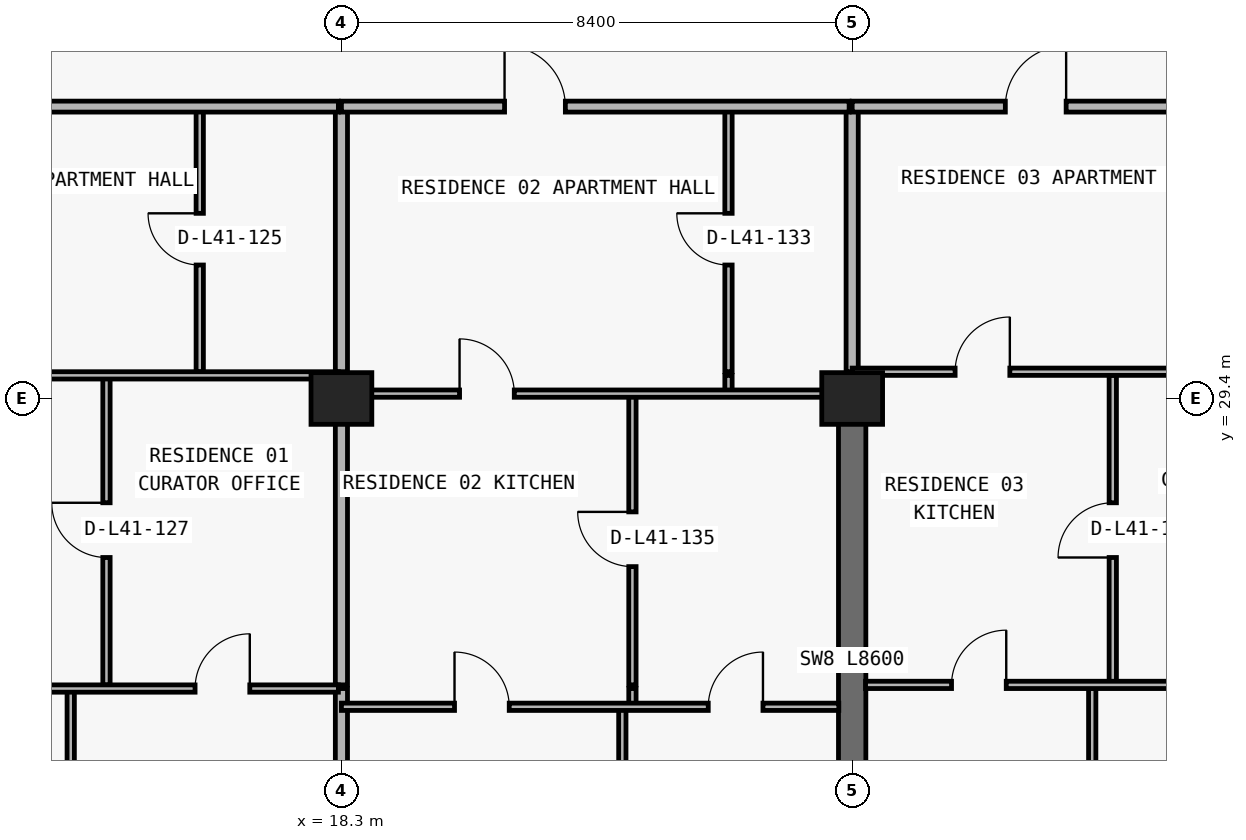
"""IFC4 building model, lengths in metres.
Left out: names, types, materials, properties, quantities, classifications, styles, units other than length and angle.
Written with IfcOpenShell. Run it as: python <this file> out.ifc"""

import sys

from ifc_helpers import new_model, si_unit, direction, frame, frame_2d, origin, origin_2d, place, context, subcontext, project, spatial, rectangle, extrude, element, fill, save


model = new_model("IFC4")
c1 = context("Model", 3, precision=1e-05, world=origin(), true_north=direction((0.0, 1.0)))
c2 = subcontext(c1, "Body", "Model", "MODEL_VIEW")
j1 = project(units=[si_unit("LENGTHUNIT", "METRE"), si_unit("PLANEANGLEUNIT", "RADIAN")], contexts=[c1])
p1 = place(None, origin())
s1 = spatial("IfcSite", under=j1, at=p1, CompositionType="ELEMENT")
p2 = place(p1, origin())
s2 = spatial("IfcBuilding", under=s1, at=p2, CompositionType="ELEMENT")
p3 = place(p2, frame((0.0, 0.0, 148.8)))
s3 = spatial("IfcBuildingStorey", under=s2, at=p3, CompositionType="ELEMENT", Elevation=148.8)
for number, where, z_axis, x_axis in (
    (1, (18.3, 29.4, 0.0), (0.0, 0.0, 1.0), (1.0, 0.0, 0.0)),
    (2, (26.7, 29.4, 0.0), (0.0, 0.0, 1.0), (1.0, 0.0, 0.0)),
):
    element("IfcColumn", number, at=place(p3, frame(where, z_axis=z_axis, x_axis=x_axis)), inside=s3, PredefinedType="COLUMN", context=c2, shape_type="SweptSolid", body=[
        extrude(rectangle(XDim=1.0, YDim=0.85, at=origin_2d()), origin(), (0.0, 0.0, 1.0), 3.0),
    ])
p4 = place(p3, frame((26.7, 20.8, 0.0), z_axis=(0.0, 0.0, 1.0), x_axis=(0.0, 1.0, 0.0)))
e3 = element("IfcWall", 3, at=p4, inside=s3, PredefinedType="SHEAR", context=c2, shape_type="SweptSolid", body=[
    extrude(rectangle(XDim=8.6, YDim=0.45, at=frame_2d((4.3, 0.0))), origin(), (0.0, 0.0, 1.0), 3.0),
])
p5 = place(p3, frame((13.848, 8.84, 0.0), z_axis=(0.0, 0.0, 1.0), x_axis=(0.0, 1.0, 0.0)))
e4 = element("IfcWall", 4, at=p5, inside=s3, PredefinedType="PARTITIONING", context=c2, shape_type="SweptSolid", body=[
    extrude(rectangle(XDim=15.79, YDim=0.12, at=frame_2d((7.895, 0.0))), origin(), (0.0, 0.0, 1.0), 3.0),
])
p6 = place(p3, frame((14.436, 24.69, 0.0), z_axis=(0.0, 0.0, 1.0), x_axis=(0.0, 1.0, 0.0)))
e5 = element("IfcWall", 5, at=p6, inside=s3, PredefinedType="PARTITIONING", context=c2, shape_type="SweptSolid", body=[
    extrude(rectangle(XDim=5.09, YDim=0.12, at=frame_2d((2.545, 0.0))), origin(), (0.0, 0.0, 1.0), 3.0),
])
p7 = place(p6, frame((2.095, 0.0, 0.0)))
e6 = element("IfcOpeningElement", 6, at=p7, cuts=e5, PredefinedType="OPENING", context=c2, shape_type="SweptSolid", body=[
    extrude(rectangle(XDim=0.9, YDim=2.15, at=frame_2d((0.45, 1.075))), frame((0.0, 0.07, 0.0), z_axis=(0.0, -1.0, 0.0), x_axis=(1.0, 0.0, 0.0)), (0.0, 0.0, 1.0), 0.14),
])
p8 = place(p3, frame((15.97, 29.84, 0.0), z_axis=(0.0, 0.0, 1.0), x_axis=(0.0, 1.0, 0.0)))
e7 = element("IfcWall", 7, at=p8, inside=s3, PredefinedType="PARTITIONING", context=c2, shape_type="SweptSolid", body=[
    extrude(rectangle(XDim=4.36, YDim=0.12, at=frame_2d((2.18, 0.0))), origin(), (0.0, 0.0, 1.0), 3.0),
])
p9 = place(p8, frame((1.755, 0.0, 0.0)))
e8 = element("IfcOpeningElement", 8, at=p9, cuts=e7, PredefinedType="OPENING", context=c2, shape_type="SweptSolid", body=[
    extrude(rectangle(XDim=0.85, YDim=2.1, at=frame_2d((0.425, 1.05))), frame((0.0, 0.07, 0.0), z_axis=(0.0, -1.0, 0.0), x_axis=(1.0, 0.0, 0.0)), (0.0, 0.0, 1.0), 0.14),
])
p10 = place(p3, frame((18.3, 8.84, 0.0), z_axis=(0.0, 0.0, 1.0), x_axis=(0.0, 1.0, 0.0)))
e9 = element("IfcWall", 9, at=p10, inside=s3, PredefinedType="PARTITIONING", context=c2, shape_type="SweptSolid", body=[
    extrude(rectangle(XDim=15.79, YDim=0.2, at=frame_2d((7.895, 0.0))), origin(), (0.0, 0.0, 1.0), 2.124),
])
p11 = place(p3, frame((18.3, 24.69, 0.0), z_axis=(0.0, 0.0, 1.0), x_axis=(0.0, 1.0, 0.0)))
e10 = element("IfcWall", 10, at=p11, inside=s3, PredefinedType="PARTITIONING", context=c2, shape_type="SweptSolid", body=[
    extrude(rectangle(XDim=5.09, YDim=0.2, at=frame_2d((2.545, 0.0))), origin(), (0.0, 0.0, 1.0), 2.124),
])
p12 = place(p3, frame((18.3, 29.84, 0.0), z_axis=(0.0, 0.0, 1.0), x_axis=(0.0, 1.0, 0.0)))
e11 = element("IfcWall", 11, at=p12, inside=s3, PredefinedType="PARTITIONING", context=c2, shape_type="SweptSolid", body=[
    extrude(rectangle(XDim=4.36, YDim=0.2, at=frame_2d((2.18, 0.0))), origin(), (0.0, 0.0, 1.0), 2.124),
])
p13 = place(p3, frame((22.92, 8.84, 0.0), z_axis=(0.0, 0.0, 1.0), x_axis=(0.0, 1.0, 0.0)))
e12 = element("IfcWall", 12, at=p13, inside=s3, PredefinedType="PARTITIONING", context=c2, shape_type="SweptSolid", body=[
    extrude(rectangle(XDim=15.49, YDim=0.12, at=frame_2d((7.745, 0.0))), origin(), (0.0, 0.0, 1.0), 3.0),
])
p14 = place(p3, frame((23.086, 24.335, 0.0), z_axis=(0.0, 0.0, 1.0), x_axis=(0.0, 1.0, 0.0)))
e13 = element("IfcWall", 13, at=p14, inside=s3, PredefinedType="PARTITIONING", context=c2, shape_type="SweptSolid", body=[
    extrude(rectangle(XDim=0.295, YDim=0.12, at=frame_2d((0.147, 0.0))), origin(), (0.0, 0.0, 1.0), 3.0),
])
p15 = place(p3, frame((23.086, 24.69, 0.0), z_axis=(0.0, 0.0, 1.0), x_axis=(0.0, 1.0, 0.0)))
e14 = element("IfcWall", 14, at=p15, inside=s3, PredefinedType="PARTITIONING", context=c2, shape_type="SweptSolid", body=[
    extrude(rectangle(XDim=4.79, YDim=0.12, at=frame_2d((2.395, 0.0))), origin(), (0.0, 0.0, 1.0), 3.0),
])
p16 = place(p15, frame((1.945, 0.0, 0.0)))
e15 = element("IfcOpeningElement", 15, at=p16, cuts=e14, PredefinedType="OPENING", context=c2, shape_type="SweptSolid", body=[
    extrude(rectangle(XDim=0.9, YDim=2.15, at=frame_2d((0.45, 1.075))), frame((0.0, 0.07, 0.0), z_axis=(0.0, -1.0, 0.0), x_axis=(1.0, 0.0, 0.0)), (0.0, 0.0, 1.0), 0.14),
])
p17 = place(p3, frame((24.666, 29.48, 0.0), z_axis=(0.0, 0.0, 1.0), x_axis=(0.0, 1.0, 0.0)))
e16 = element("IfcWall", 16, at=p17, inside=s3, PredefinedType="PARTITIONING", context=c2, shape_type="SweptSolid", body=[
    extrude(rectangle(XDim=0.3, YDim=0.12, at=frame_2d((0.15, 0.0))), origin(), (0.0, 0.0, 1.0), 3.0),
])
p18 = place(p3, frame((24.666, 29.84, 0.0), z_axis=(0.0, 0.0, 1.0), x_axis=(0.0, 1.0, 0.0)))
e17 = element("IfcWall", 17, at=p18, inside=s3, PredefinedType="PARTITIONING", context=c2, shape_type="SweptSolid", body=[
    extrude(rectangle(XDim=4.36, YDim=0.12, at=frame_2d((2.18, 0.0))), origin(), (0.0, 0.0, 1.0), 3.0),
])
p19 = place(p18, frame((1.755, 0.0, 0.0)))
e18 = element("IfcOpeningElement", 18, at=p19, cuts=e17, PredefinedType="OPENING", context=c2, shape_type="SweptSolid", body=[
    extrude(rectangle(XDim=0.85, YDim=2.1, at=frame_2d((0.425, 1.05))), frame((0.0, 0.07, 0.0), z_axis=(0.0, -1.0, 0.0), x_axis=(1.0, 0.0, 0.0)), (0.0, 0.0, 1.0), 0.14),
])
p20 = place(p3, frame((26.7, 29.405, 0.0), z_axis=(0.0, 0.0, 1.0), x_axis=(0.0, 1.0, 0.0)))
e19 = element("IfcWall", 19, at=p20, inside=s3, PredefinedType="PARTITIONING", context=c2, shape_type="SweptSolid", body=[
    extrude(rectangle(XDim=0.375, YDim=0.2, at=frame_2d((0.188, 0.0))), origin(), (0.0, 0.0, 1.0), 3.0),
])
p21 = place(p3, frame((26.7, 29.84, 0.0), z_axis=(0.0, 0.0, 1.0), x_axis=(0.0, 1.0, 0.0)))
e20 = element("IfcWall", 20, at=p21, inside=s3, PredefinedType="PARTITIONING", context=c2, shape_type="SweptSolid", body=[
    extrude(rectangle(XDim=4.36, YDim=0.2, at=frame_2d((2.18, 0.0))), origin(), (0.0, 0.0, 1.0), 2.285),
])
p22 = place(p3, frame((30.648, 8.84, 0.0), z_axis=(0.0, 0.0, 1.0), x_axis=(0.0, 1.0, 0.0)))
e21 = element("IfcWall", 21, at=p22, inside=s3, PredefinedType="PARTITIONING", context=c2, shape_type="SweptSolid", body=[
    extrude(rectangle(XDim=15.79, YDim=0.12, at=frame_2d((7.895, 0.0))), origin(), (0.0, 0.0, 1.0), 3.0),
])
p23 = place(p3, frame((30.986, 24.69, 0.0), z_axis=(0.0, 0.0, 1.0), x_axis=(0.0, 1.0, 0.0)))
e22 = element("IfcWall", 22, at=p23, inside=s3, PredefinedType="PARTITIONING", context=c2, shape_type="SweptSolid", body=[
    extrude(rectangle(XDim=5.09, YDim=0.12, at=frame_2d((2.545, 0.0))), origin(), (0.0, 0.0, 1.0), 2.436),
])
p24 = place(p23, frame((2.095, 0.0, 0.0)))
e23 = element("IfcOpeningElement", 23, at=p24, cuts=e22, PredefinedType="OPENING", context=c2, shape_type="SweptSolid", body=[
    extrude(rectangle(XDim=0.9, YDim=2.15, at=frame_2d((0.45, 1.075))), frame((0.0, 0.07, 0.0), z_axis=(0.0, -1.0, 0.0), x_axis=(1.0, 0.0, 0.0)), (0.0, 0.0, 1.0), 0.14),
])
p25 = place(p3, frame((18.3, 24.33, 0.0), z_axis=(0.0, 0.0, 1.0), x_axis=(1.0, 0.0, 0.0)))
e24 = element("IfcWall", 24, at=p25, inside=s3, PredefinedType="PARTITIONING", context=c2, shape_type="SweptSolid", body=[
    extrude(rectangle(XDim=8.18, YDim=0.12, at=frame_2d((4.09, 0.0))), origin(), (0.0, 0.0, 1.0), 3.0),
])
p26 = place(p25, frame((1.86, 0.0, 0.0)))
e25 = element("IfcOpeningElement", 25, at=p26, cuts=e24, PredefinedType="OPENING", context=c2, shape_type="SweptSolid", body=[
    extrude(rectangle(XDim=0.9, YDim=2.15, at=frame_2d((0.45, 1.075))), frame((0.0, 0.07, 0.0), z_axis=(0.0, -1.0, 0.0), x_axis=(1.0, 0.0, 0.0)), (0.0, 0.0, 1.0), 0.14),
])
p27 = place(p25, frame((6.033, 0.0, 0.0)))
e26 = element("IfcOpeningElement", 26, at=p27, cuts=e24, PredefinedType="OPENING", context=c2, shape_type="SweptSolid", body=[
    extrude(rectangle(XDim=0.9, YDim=2.15, at=frame_2d((0.45, 1.075))), frame((0.0, 0.07, 0.0), z_axis=(0.0, -1.0, 0.0), x_axis=(1.0, 0.0, 0.0)), (0.0, 0.0, 1.0), 0.14),
])
p28 = place(p3, frame((9.9, 24.63, 0.0), z_axis=(0.0, 0.0, 1.0), x_axis=(1.0, 0.0, 0.0)))
e27 = element("IfcWall", 27, at=p28, inside=s3, PredefinedType="PARTITIONING", context=c2, shape_type="SweptSolid", body=[
    extrude(rectangle(XDim=8.35, YDim=0.12, at=frame_2d((4.175, 0.0))), origin(), (0.0, 0.0, 1.0), 3.0),
])
p29 = place(p28, frame((1.524, 0.0, 0.0)))
e28 = element("IfcOpeningElement", 28, at=p29, cuts=e27, PredefinedType="OPENING", context=c2, shape_type="SweptSolid", body=[
    extrude(rectangle(XDim=0.9, YDim=2.15, at=frame_2d((0.45, 1.075))), frame((0.0, 0.07, 0.0), z_axis=(0.0, -1.0, 0.0), x_axis=(1.0, 0.0, 0.0)), (0.0, 0.0, 1.0), 0.14),
])
p30 = place(p28, frame((5.993, 0.0, 0.0)))
e29 = element("IfcOpeningElement", 29, at=p30, cuts=e27, PredefinedType="OPENING", context=c2, shape_type="SweptSolid", body=[
    extrude(rectangle(XDim=0.9, YDim=2.15, at=frame_2d((0.45, 1.075))), frame((0.0, 0.07, 0.0), z_axis=(0.0, -1.0, 0.0), x_axis=(1.0, 0.0, 0.0)), (0.0, 0.0, 1.0), 0.14),
])
p31 = place(p3, frame((26.92, 24.69, 0.0), z_axis=(0.0, 0.0, 1.0), x_axis=(1.0, 0.0, 0.0)))
e30 = element("IfcWall", 30, at=p31, inside=s3, PredefinedType="PARTITIONING", context=c2, shape_type="SweptSolid", body=[
    extrude(rectangle(XDim=8.18, YDim=0.12, at=frame_2d((4.09, 0.0))), origin(), (0.0, 0.0, 1.0), 3.0),
])
p32 = place(p31, frame((1.414, 0.0, 0.0)))
e31 = element("IfcOpeningElement", 31, at=p32, cuts=e30, PredefinedType="OPENING", context=c2, shape_type="SweptSolid", body=[
    extrude(rectangle(XDim=0.9, YDim=2.15, at=frame_2d((0.45, 1.075))), frame((0.0, 0.07, 0.0), z_axis=(0.0, -1.0, 0.0), x_axis=(1.0, 0.0, 0.0)), (0.0, 0.0, 1.0), 0.14),
])
p33 = place(p31, frame((5.673, 0.0, 0.0)))
e32 = element("IfcOpeningElement", 32, at=p33, cuts=e30, PredefinedType="OPENING", context=c2, shape_type="SweptSolid", body=[
    extrude(rectangle(XDim=0.9, YDim=2.15, at=frame_2d((0.45, 1.075))), frame((0.0, 0.07, 0.0), z_axis=(0.0, -1.0, 0.0), x_axis=(1.0, 0.0, 0.0)), (0.0, 0.0, 1.0), 0.14),
])
p34 = place(p3, frame((18.3, 29.48, 0.0), z_axis=(0.0, 0.0, 1.0), x_axis=(1.0, 0.0, 0.0)))
e33 = element("IfcWall", 33, at=p34, inside=s3, PredefinedType="PARTITIONING", context=c2, shape_type="SweptSolid", body=[
    extrude(rectangle(XDim=8.18, YDim=0.12, at=frame_2d((4.09, 0.0))), origin(), (0.0, 0.0, 1.0), 2.124),
])
p35 = place(p34, frame((1.943, 0.0, 0.0)))
e34 = element("IfcOpeningElement", 34, at=p35, cuts=e33, PredefinedType="OPENING", context=c2, shape_type="SweptSolid", body=[
    extrude(rectangle(XDim=0.9, YDim=2.074, at=frame_2d((0.45, 1.037))), frame((0.0, 0.07, 0.0), z_axis=(0.0, -1.0, 0.0), x_axis=(1.0, 0.0, 0.0)), (0.0, 0.0, 1.0), 0.14),
])
p36 = place(p3, frame((9.9, 29.78, 0.0), z_axis=(0.0, 0.0, 1.0), x_axis=(1.0, 0.0, 0.0)))
e35 = element("IfcWall", 35, at=p36, inside=s3, PredefinedType="PARTITIONING", context=c2, shape_type="SweptSolid", body=[
    extrude(rectangle(XDim=8.35, YDim=0.12, at=frame_2d((4.175, 0.0))), origin(), (0.0, 0.0, 1.0), 3.0),
])
p37 = place(p36, frame((1.818, 0.0, 0.0)))
e36 = element("IfcOpeningElement", 36, at=p37, cuts=e35, PredefinedType="OPENING", context=c2, shape_type="SweptSolid", body=[
    extrude(rectangle(XDim=0.9, YDim=2.15, at=frame_2d((0.45, 1.075))), frame((0.0, 0.07, 0.0), z_axis=(0.0, -1.0, 0.0), x_axis=(1.0, 0.0, 0.0)), (0.0, 0.0, 1.0), 0.14),
])
p38 = place(p3, frame((26.7, 29.84, 0.0), z_axis=(0.0, 0.0, 1.0), x_axis=(1.0, 0.0, 0.0)))
e37 = element("IfcWall", 37, at=p38, inside=s3, PredefinedType="PARTITIONING", context=c2, shape_type="SweptSolid", body=[
    extrude(rectangle(XDim=8.4, YDim=0.12, at=frame_2d((4.2, 0.0))), origin(), (0.0, 0.0, 1.0), 3.0),
])
p39 = place(p38, frame((1.693, 0.0, 0.0)))
e38 = element("IfcOpeningElement", 38, at=p39, cuts=e37, PredefinedType="OPENING", context=c2, shape_type="SweptSolid", body=[
    extrude(rectangle(XDim=0.9, YDim=2.15, at=frame_2d((0.45, 1.075))), frame((0.0, 0.07, 0.0), z_axis=(0.0, -1.0, 0.0), x_axis=(1.0, 0.0, 0.0)), (0.0, 0.0, 1.0), 0.14),
])
p40 = place(p3, frame((7.705, 34.2, 0.0), z_axis=(0.0, 0.0, 1.0), x_axis=(1.0, 0.0, 0.0)))
e39 = element("IfcWall", 39, at=p40, inside=s3, PredefinedType="PARTITIONING", context=c2, shape_type="SweptSolid", body=[
    extrude(rectangle(XDim=10.545, YDim=0.18, at=frame_2d((5.272, 0.0))), origin(), (0.0, 0.0, 1.0), 3.0),
])
p41 = place(p40, frame((4.73, 0.0, 0.0)))
e40 = element("IfcOpeningElement", 40, at=p41, cuts=e39, PredefinedType="OPENING", context=c2, shape_type="SweptSolid", body=[
    extrude(rectangle(XDim=1.0, YDim=2.2, at=frame_2d((0.5, 1.1))), frame((0.0, 0.1, 0.0), z_axis=(0.0, -1.0, 0.0), x_axis=(1.0, 0.0, 0.0)), (0.0, 0.0, 1.0), 0.2),
])
p42 = place(p3, frame((18.3, 34.2, 0.0), z_axis=(0.0, 0.0, 1.0), x_axis=(1.0, 0.0, 0.0)))
e41 = element("IfcWall", 41, at=p42, inside=s3, PredefinedType="PARTITIONING", context=c2, shape_type="SweptSolid", body=[
    extrude(rectangle(XDim=8.35, YDim=0.18, at=frame_2d((4.175, 0.0))), origin(), (0.0, 0.0, 1.0), 3.0),
])
p43 = place(p42, frame((2.683, 0.0, 0.0)))
e42 = element("IfcOpeningElement", 42, at=p43, cuts=e41, PredefinedType="OPENING", context=c2, shape_type="SweptSolid", body=[
    extrude(rectangle(XDim=1.0, YDim=2.2, at=frame_2d((0.5, 1.1))), frame((0.0, 0.1, 0.0), z_axis=(0.0, -1.0, 0.0), x_axis=(1.0, 0.0, 0.0)), (0.0, 0.0, 1.0), 0.2),
])
p44 = place(p3, frame((26.7, 34.2, 0.0), z_axis=(0.0, 0.0, 1.0), x_axis=(1.0, 0.0, 0.0)))
e43 = element("IfcWall", 43, at=p44, inside=s3, PredefinedType="PARTITIONING", context=c2, shape_type="SweptSolid", body=[
    extrude(rectangle(XDim=32.8, YDim=0.18, at=frame_2d((16.4, 0.0))), origin(), (0.0, 0.0, 1.0), 3.0),
])
p45 = place(p44, frame((2.519, 0.0, 0.0)))
e44 = element("IfcOpeningElement", 44, at=p45, cuts=e43, PredefinedType="OPENING", context=c2, shape_type="SweptSolid", body=[
    extrude(rectangle(XDim=1.0, YDim=2.2, at=frame_2d((0.5, 1.1))), frame((0.0, 0.1, 0.0), z_axis=(0.0, -1.0, 0.0), x_axis=(1.0, 0.0, 0.0)), (0.0, 0.0, 1.0), 0.2),
])
p46 = place(p44, frame((10.792, 0.0, 0.0)))
e45 = element("IfcOpeningElement", 45, at=p46, cuts=e43, PredefinedType="OPENING", context=c2, shape_type="SweptSolid", body=[
    extrude(rectangle(XDim=1.0, YDim=2.2, at=frame_2d((0.5, 1.1))), frame((0.0, 0.1, 0.0), z_axis=(0.0, -1.0, 0.0), x_axis=(1.0, 0.0, 0.0)), (0.0, 0.0, 1.0), 0.2),
])
p47 = place(p44, frame((27.146, 0.0, 0.0)))
e46 = element("IfcOpeningElement", 46, at=p47, cuts=e43, PredefinedType="OPENING", context=c2, shape_type="SweptSolid", body=[
    extrude(rectangle(XDim=1.0, YDim=2.2, at=frame_2d((0.5, 1.1))), frame((0.0, 0.1, 0.0), z_axis=(0.0, -1.0, 0.0), x_axis=(1.0, 0.0, 0.0)), (0.0, 0.0, 1.0), 0.2),
])
p48 = place(p9, origin())
e47 = element("IfcDoor", 47, at=p48, inside=s3, OperationType="SINGLE_SWING_RIGHT", PredefinedType="DOOR", context=c2, shape_type="SweptSolid", body=[
    extrude(rectangle(XDim=0.85, YDim=2.1, at=frame_2d((0.425, 1.05))), frame((0.0, 0.025, 0.0), z_axis=(0.0, -1.0, 0.0), x_axis=(1.0, 0.0, 0.0)), (0.0, 0.0, 1.0), 0.05),
])
fill(e8, e47)
p49 = place(p7, origin())
e48 = element("IfcDoor", 48, at=p49, inside=s3, OperationType="SINGLE_SWING_RIGHT", PredefinedType="DOOR", context=c2, shape_type="SweptSolid", body=[
    extrude(rectangle(XDim=0.9, YDim=2.15, at=frame_2d((0.45, 1.075))), frame((0.0, 0.025, 0.0), z_axis=(0.0, -1.0, 0.0), x_axis=(1.0, 0.0, 0.0)), (0.0, 0.0, 1.0), 0.05),
])
fill(e6, e48)
p50 = place(p30, origin())
e49 = element("IfcDoor", 49, at=p50, inside=s3, OperationType="SINGLE_SWING_RIGHT", PredefinedType="DOOR", context=c2, shape_type="SweptSolid", body=[
    extrude(rectangle(XDim=0.9, YDim=2.15, at=frame_2d((0.45, 1.075))), frame((0.0, 0.025, 0.0), z_axis=(0.0, -1.0, 0.0), x_axis=(1.0, 0.0, 0.0)), (0.0, 0.0, 1.0), 0.05),
])
fill(e29, e49)
p51 = place(p43, origin())
e50 = element("IfcDoor", 50, at=p51, inside=s3, OperationType="SINGLE_SWING_LEFT", PredefinedType="DOOR", context=c2, shape_type="SweptSolid", body=[
    extrude(rectangle(XDim=1.0, YDim=2.2, at=frame_2d((0.5, 1.1))), frame((0.0, 0.025, 0.0), z_axis=(0.0, -1.0, 0.0), x_axis=(1.0, 0.0, 0.0)), (0.0, 0.0, 1.0), 0.05),
])
fill(e42, e50)
p52 = place(p19, origin())
e51 = element("IfcDoor", 51, at=p52, inside=s3, OperationType="SINGLE_SWING_RIGHT", PredefinedType="DOOR", context=c2, shape_type="SweptSolid", body=[
    extrude(rectangle(XDim=0.85, YDim=2.1, at=frame_2d((0.425, 1.05))), frame((0.0, 0.025, 0.0), z_axis=(0.0, -1.0, 0.0), x_axis=(1.0, 0.0, 0.0)), (0.0, 0.0, 1.0), 0.05),
])
fill(e18, e51)
p53 = place(p35, origin())
e52 = element("IfcDoor", 52, at=p53, inside=s3, OperationType="SINGLE_SWING_LEFT", PredefinedType="DOOR", context=c2, shape_type="SweptSolid", body=[
    extrude(rectangle(XDim=0.9, YDim=2.074, at=frame_2d((0.45, 1.037))), frame((0.0, 0.025, 0.0), z_axis=(0.0, -1.0, 0.0), x_axis=(1.0, 0.0, 0.0)), (0.0, 0.0, 1.0), 0.05),
])
fill(e34, e52)
p54 = place(p16, origin())
e53 = element("IfcDoor", 53, at=p54, inside=s3, OperationType="SINGLE_SWING_RIGHT", PredefinedType="DOOR", context=c2, shape_type="SweptSolid", body=[
    extrude(rectangle(XDim=0.9, YDim=2.15, at=frame_2d((0.45, 1.075))), frame((0.0, 0.025, 0.0), z_axis=(0.0, -1.0, 0.0), x_axis=(1.0, 0.0, 0.0)), (0.0, 0.0, 1.0), 0.05),
])
fill(e15, e53)
p55 = place(p26, origin())
e54 = element("IfcDoor", 54, at=p55, inside=s3, OperationType="SINGLE_SWING_LEFT", PredefinedType="DOOR", context=c2, shape_type="SweptSolid", body=[
    extrude(rectangle(XDim=0.9, YDim=2.15, at=frame_2d((0.45, 1.075))), frame((0.0, 0.025, 0.0), z_axis=(0.0, -1.0, 0.0), x_axis=(1.0, 0.0, 0.0)), (0.0, 0.0, 1.0), 0.05),
])
fill(e25, e54)
p56 = place(p27, origin())
e55 = element("IfcDoor", 55, at=p56, inside=s3, OperationType="SINGLE_SWING_RIGHT", PredefinedType="DOOR", context=c2, shape_type="SweptSolid", body=[
    extrude(rectangle(XDim=0.9, YDim=2.15, at=frame_2d((0.45, 1.075))), frame((0.0, 0.025, 0.0), z_axis=(0.0, -1.0, 0.0), x_axis=(1.0, 0.0, 0.0)), (0.0, 0.0, 1.0), 0.05),
])
fill(e26, e55)
p57 = place(p45, origin())
e56 = element("IfcDoor", 56, at=p57, inside=s3, OperationType="SINGLE_SWING_RIGHT", PredefinedType="DOOR", context=c2, shape_type="SweptSolid", body=[
    extrude(rectangle(XDim=1.0, YDim=2.2, at=frame_2d((0.5, 1.1))), frame((0.0, 0.025, 0.0), z_axis=(0.0, -1.0, 0.0), x_axis=(1.0, 0.0, 0.0)), (0.0, 0.0, 1.0), 0.05),
])
fill(e44, e56)
p58 = place(p39, origin())
e57 = element("IfcDoor", 57, at=p58, inside=s3, OperationType="SINGLE_SWING_RIGHT", PredefinedType="DOOR", context=c2, shape_type="SweptSolid", body=[
    extrude(rectangle(XDim=0.9, YDim=2.15, at=frame_2d((0.45, 1.075))), frame((0.0, 0.025, 0.0), z_axis=(0.0, -1.0, 0.0), x_axis=(1.0, 0.0, 0.0)), (0.0, 0.0, 1.0), 0.05),
])
fill(e38, e57)
p59 = place(p24, origin())
e58 = element("IfcDoor", 58, at=p59, inside=s3, OperationType="SINGLE_SWING_LEFT", PredefinedType="DOOR", context=c2, shape_type="SweptSolid", body=[
    extrude(rectangle(XDim=0.9, YDim=2.15, at=frame_2d((0.45, 1.075))), frame((0.0, 0.025, 0.0), z_axis=(0.0, -1.0, 0.0), x_axis=(1.0, 0.0, 0.0)), (0.0, 0.0, 1.0), 0.05),
])
fill(e23, e58)
p60 = place(p32, origin())
e59 = element("IfcDoor", 59, at=p60, inside=s3, OperationType="SINGLE_SWING_RIGHT", PredefinedType="DOOR", context=c2, shape_type="SweptSolid", body=[
    extrude(rectangle(XDim=0.9, YDim=2.15, at=frame_2d((0.45, 1.075))), frame((0.0, 0.025, 0.0), z_axis=(0.0, -1.0, 0.0), x_axis=(1.0, 0.0, 0.0)), (0.0, 0.0, 1.0), 0.05),
])
fill(e31, e59)
save(model, sys.argv[1])
